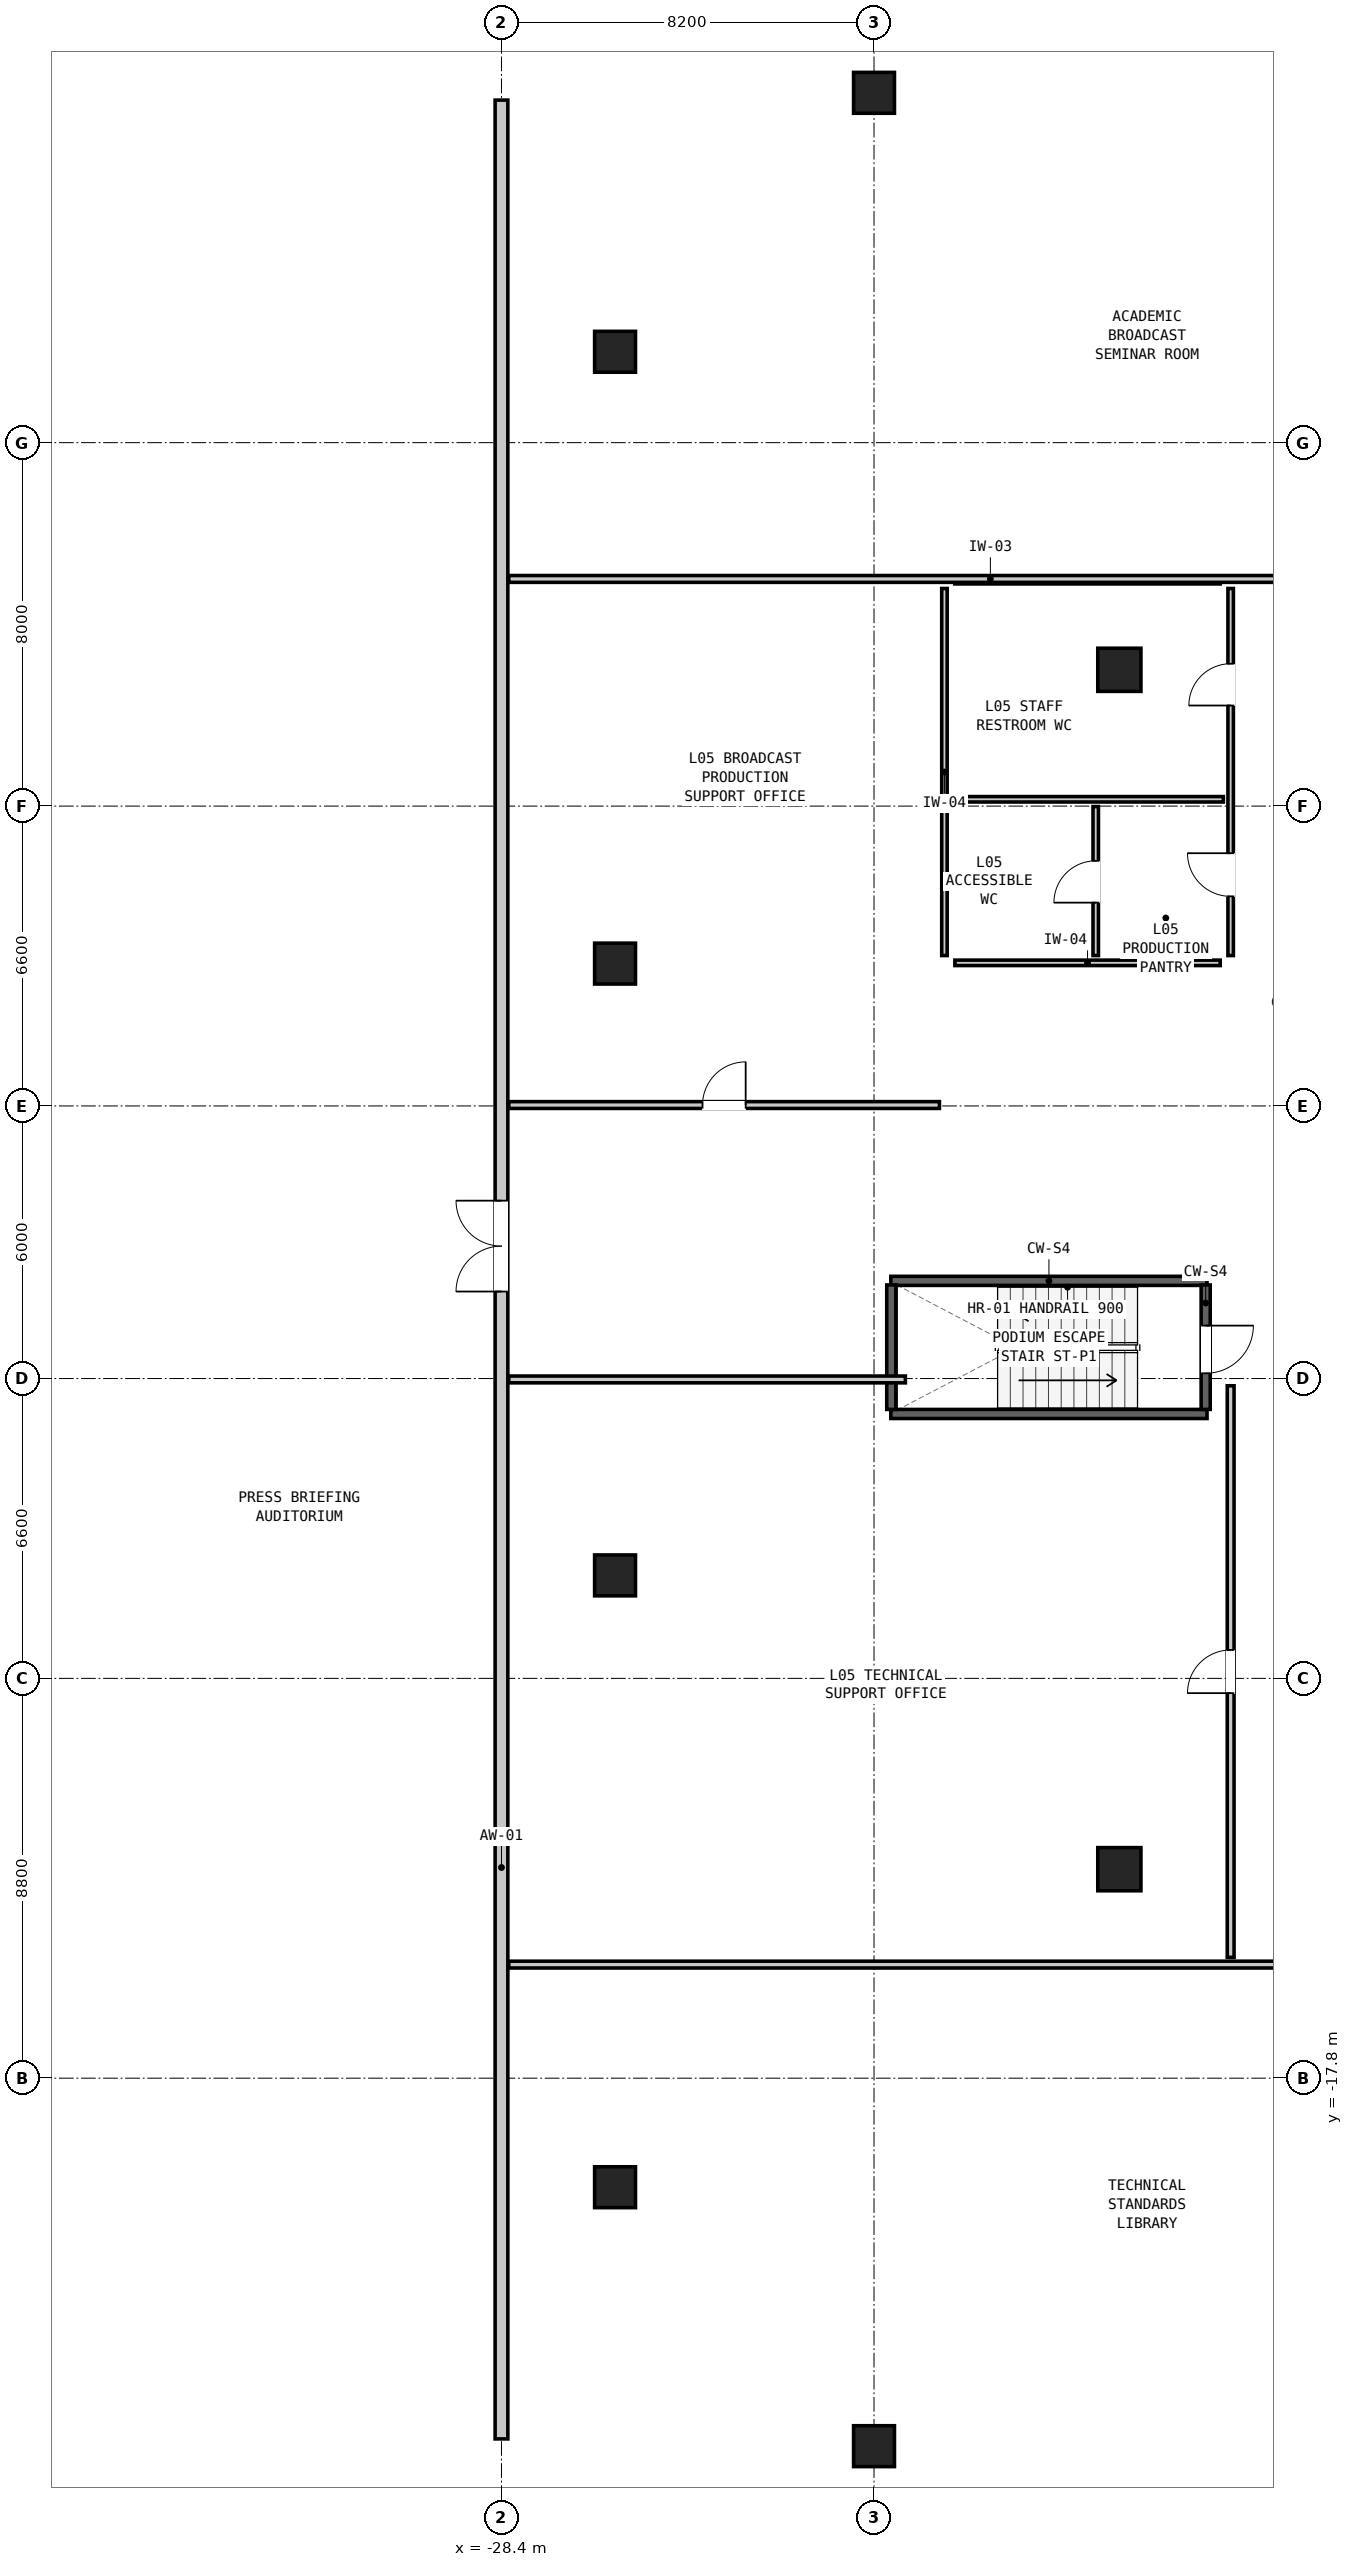
"""IFC4 building model, lengths in metres.
Left out: names, types, materials, properties, quantities, classifications, styles, units other than length and angle.
Written with IfcOpenShell. Run it as: python <this file> out.ifc"""

import sys

from ifc_helpers import new_model, si_unit, direction, frame, frame_2d, origin, origin_2d, place, context, subcontext, project, spatial, rectangle, hollow_rectangle, extrude, element, fill, save


model = new_model("IFC4")
c1 = context("Model", 3, precision=1e-05, world=origin(), true_north=direction((0.0, 1.0)))
c2 = subcontext(c1, "Body", "Model", "MODEL_VIEW")
j1 = project(units=[si_unit("LENGTHUNIT", "METRE"), si_unit("PLANEANGLEUNIT", "RADIAN")], contexts=[c1])
p1 = place(None, origin())
s1 = spatial("IfcSite", under=j1, at=p1, CompositionType="ELEMENT")
p2 = place(p1, origin())
s2 = spatial("IfcBuilding", under=s1, at=p2, CompositionType="ELEMENT")
p3 = place(p2, frame((0.0, 0.0, 21.9)))
s3 = spatial("IfcBuildingStorey", under=s2, at=p3, CompositionType="ELEMENT", Elevation=21.9)
for number, where, z_axis, x_axis in (
    (1, (-14.8, -13.2, 0.0), (0.0, 0.0, 1.0), (1.0, 0.0, 0.0)),
    (2, (-14.8, 13.2, 0.0), (0.0, 0.0, 1.0), (1.0, 0.0, 0.0)),
):
    element("IfcColumn", number, at=place(p3, frame(where, z_axis=z_axis, x_axis=x_axis)), inside=s3, PredefinedType="COLUMN", context=c2, shape_type="SweptSolid", body=[
        extrude(hollow_rectangle(XDim=0.95, YDim=0.95, WallThickness=0.06, at=origin_2d()), origin(), (0.0, 0.0, 1.0), 4.2),
    ])
for number, where, z_axis, x_axis in (
    (3, (-20.2, -25.9, 0.0), (0.0, 0.0, 1.0), (1.0, 0.0, 0.0)),
    (4, (-20.2, 25.9, 0.0), (0.0, 0.0, 1.0), (1.0, 0.0, 0.0)),
    (5, (-25.9, 20.2, 0.0), (0.0, 0.0, 1.0), (0.0, 1.0, 0.0)),
    (6, (-25.9, 6.733, 0.0), (0.0, 0.0, 1.0), (0.0, 1.0, 0.0)),
    (7, (-25.9, -6.733, 0.0), (0.0, 0.0, 1.0), (0.0, 1.0, 0.0)),
    (8, (-25.9, -20.2, 0.0), (0.0, 0.0, 1.0), (0.0, 1.0, 0.0)),
):
    element("IfcColumn", number, at=place(p3, frame(where, z_axis=z_axis, x_axis=x_axis)), inside=s3, PredefinedType="COLUMN", context=c2, shape_type="SweptSolid", body=[
        extrude(hollow_rectangle(XDim=0.9, YDim=0.9, WallThickness=0.055, at=origin_2d()), origin(), (0.0, 0.0, 1.0), 4.2),
    ])
for number, where, z_axis, x_axis in (
    (9, (-19.83, -0.25, 0.0), (0.0, 0.0, 1.0), (1.0, 0.0, 0.0)),
    (10, (-19.83, -3.18, 0.0), (0.0, 0.0, 1.0), (1.0, 0.0, 0.0)),
):
    element("IfcWall", number, at=place(p3, frame(where, z_axis=z_axis, x_axis=x_axis)), inside=s3, PredefinedType="SHEAR", context=c2, shape_type="SweptSolid", body=[
        extrude(rectangle(XDim=6.96, YDim=0.2, at=frame_2d((3.48, 0.0))), origin(), (0.0, 0.0, 1.0), 3.98),
    ])
p4 = place(p3, frame((-12.9, -0.34, 0.0), z_axis=(0.0, 0.0, 1.0), x_axis=(0.0, -1.0, 0.0)))
e11 = element("IfcWall", 11, at=p4, inside=s3, PredefinedType="SHEAR", context=c2, shape_type="SweptSolid", body=[
    extrude(rectangle(XDim=2.74, YDim=0.2, at=frame_2d((1.37, 0.0))), origin(), (0.0, 0.0, 1.0), 3.98),
])
p5 = place(p4, frame((0.895, 0.0, 0.0)))
e12 = element("IfcOpeningElement", 12, at=p5, cuts=e11, PredefinedType="OPENING", context=c2, shape_type="SweptSolid", body=[
    extrude(rectangle(XDim=1.05, YDim=2.08, at=frame_2d((0.525, 1.04))), frame((0.0, 0.112, 0.0), z_axis=(0.0, -1.0, 0.0), x_axis=(1.0, 0.0, 0.0)), (0.0, 0.0, 1.0), 0.224),
])
p6 = place(p3, frame((-19.82, -3.08, 0.0), z_axis=(0.0, 0.0, 1.0), x_axis=(0.0, 1.0, 0.0)))
e13 = element("IfcWall", 13, at=p6, inside=s3, PredefinedType="SHEAR", context=c2, shape_type="SweptSolid", body=[
    extrude(rectangle(XDim=2.74, YDim=0.2, at=frame_2d((1.37, 0.0))), origin(), (0.0, 0.0, 1.0), 3.98),
])
p7 = place(p3, frame((-18.42, 6.75, 0.0), z_axis=(0.0, 0.0, 1.0), x_axis=(1.0, 0.0, 0.0)))
e14 = element("IfcWall", 14, at=p7, inside=s3, PredefinedType="PARTITIONING", context=c2, shape_type="SweptSolid", body=[
    extrude(rectangle(XDim=5.84, YDim=0.12, at=frame_2d((2.92, 0.0))), origin(), (0.0, 0.0, 1.0), 3.424),
])
p8 = place(p3, frame((-18.42, 15.15, 0.0), z_axis=(0.0, 0.0, 1.0), x_axis=(1.0, 0.0, 0.0)))
e15 = element("IfcWall", 15, at=p8, inside=s3, PredefinedType="PARTITIONING", context=c2, shape_type="SweptSolid", body=[
    extrude(rectangle(XDim=5.84, YDim=0.12, at=frame_2d((2.92, 0.0))), origin(), (0.0, 0.0, 1.0), 3.98),
])
p9 = place(p3, frame((-18.65, 6.91, 0.0), z_axis=(0.0, 0.0, 1.0), x_axis=(0.0, 1.0, 0.0)))
e16 = element("IfcWall", 16, at=p9, inside=s3, PredefinedType="PARTITIONING", context=c2, shape_type="SweptSolid", body=[
    extrude(rectangle(XDim=8.08, YDim=0.12, at=frame_2d((4.04, 0.0))), origin(), (0.0, 0.0, 1.0), 3.98),
])
p10 = place(p3, frame((-18.49, 10.35, 0.0), z_axis=(0.0, 0.0, 1.0), x_axis=(1.0, 0.0, 0.0)))
e17 = element("IfcWall", 17, at=p10, inside=s3, PredefinedType="PARTITIONING", context=c2, shape_type="SweptSolid", body=[
    extrude(rectangle(XDim=5.98, YDim=0.12, at=frame_2d((2.99, 0.0))), origin(), (0.0, 0.0, 1.0), 2.949),
])
p11 = place(p3, frame((-15.32, 6.91, 0.0), z_axis=(0.0, 0.0, 1.0), x_axis=(0.0, 1.0, 0.0)))
e18 = element("IfcWall", 18, at=p11, inside=s3, PredefinedType="PARTITIONING", context=c2, shape_type="SweptSolid", body=[
    extrude(rectangle(XDim=3.28, YDim=0.12, at=frame_2d((1.64, 0.0))), origin(), (0.0, 0.0, 1.0), 3.98),
])
p12 = place(p11, frame((1.165, 0.0, 0.0)))
e19 = element("IfcOpeningElement", 19, at=p12, cuts=e18, PredefinedType="OPENING", context=c2, shape_type="SweptSolid", body=[
    extrude(rectangle(XDim=0.92, YDim=2.1, at=frame_2d((0.46, 1.05))), frame((0.0, 0.072, 0.0), z_axis=(0.0, -1.0, 0.0), x_axis=(1.0, 0.0, 0.0)), (0.0, 0.0, 1.0), 0.144),
])
p13 = place(p3, frame((-12.35, 6.91, 0.0), z_axis=(0.0, 0.0, 1.0), x_axis=(0.0, 1.0, 0.0)))
e20 = element("IfcWall", 20, at=p13, inside=s3, PredefinedType="PARTITIONING", context=c2, shape_type="SweptSolid", body=[
    extrude(rectangle(XDim=8.08, YDim=0.12, at=frame_2d((4.04, 0.0))), origin(), (0.0, 0.0, 1.0), 3.98),
])
p14 = place(p13, frame((1.303, 0.0, 0.0)))
e21 = element("IfcOpeningElement", 21, at=p14, cuts=e20, PredefinedType="OPENING", context=c2, shape_type="SweptSolid", body=[
    extrude(rectangle(XDim=0.95, YDim=2.1, at=frame_2d((0.475, 1.05))), frame((0.0, 0.072, 0.0), z_axis=(0.0, -1.0, 0.0), x_axis=(1.0, 0.0, 0.0)), (0.0, 0.0, 1.0), 0.144),
])
p15 = place(p13, frame((5.504, 0.0, 0.0)))
e22 = element("IfcOpeningElement", 22, at=p15, cuts=e20, PredefinedType="OPENING", context=c2, shape_type="SweptSolid", body=[
    extrude(rectangle(XDim=0.92, YDim=2.1, at=frame_2d((0.46, 1.05))), frame((0.0, 0.072, 0.0), z_axis=(0.0, -1.0, 0.0), x_axis=(1.0, 0.0, 0.0)), (0.0, 0.0, 1.0), 0.144),
])
p16 = place(p3, frame((-28.4, -25.74, 0.0), z_axis=(0.0, 0.0, 1.0), x_axis=(0.0, 1.0, 0.0)))
e23 = element("IfcWall", 23, at=p16, inside=s3, PredefinedType="MOVABLE", context=c2, shape_type="SweptSolid", body=[
    extrude(rectangle(XDim=51.48, YDim=0.28, at=frame_2d((25.74, 0.0))), origin(), (0.0, 0.0, 1.0), 3.98),
])
p17 = place(p16, frame((25.255, 0.0, 0.0)))
e24 = element("IfcOpeningElement", 24, at=p17, cuts=e23, PredefinedType="OPENING", context=c2, shape_type="SweptSolid", body=[
    extrude(rectangle(XDim=2.0, YDim=2.14, at=frame_2d((1.0, 1.07))), frame((0.0, 0.152, 0.0), z_axis=(0.0, -1.0, 0.0), x_axis=(1.0, 0.0, 0.0)), (0.0, 0.0, 1.0), 0.304),
])
p18 = place(p3, frame((-28.24, 15.2, 0.0), z_axis=(0.0, 0.0, 1.0), x_axis=(1.0, 0.0, 0.0)))
e25 = element("IfcWall", 25, at=p18, inside=s3, PredefinedType="PARTITIONING", context=c2, shape_type="SweptSolid", body=[
    extrude(rectangle(XDim=28.08, YDim=0.15, at=frame_2d((14.04, 0.0))), origin(), (0.0, 0.0, 1.0), 3.98),
])
p19 = place(p18, frame((21.302, 0.0, 0.0)))
e26 = element("IfcOpeningElement", 26, at=p19, cuts=e25, PredefinedType="OPENING", context=c2, shape_type="SweptSolid", body=[
    extrude(rectangle(XDim=1.2, YDim=2.1, at=frame_2d((0.6, 1.05))), frame((0.0, 0.087, 0.0), z_axis=(0.0, -1.0, 0.0), x_axis=(1.0, 0.0, 0.0)), (0.0, 0.0, 1.0), 0.174),
])
p20 = place(p3, frame((-28.24, -15.3, 0.0), z_axis=(0.0, 0.0, 1.0), x_axis=(1.0, 0.0, 0.0)))
e27 = element("IfcWall", 27, at=p20, inside=s3, PredefinedType="PARTITIONING", context=c2, shape_type="SweptSolid", body=[
    extrude(rectangle(XDim=28.08, YDim=0.15, at=frame_2d((14.04, 0.0))), origin(), (0.0, 0.0, 1.0), 3.98),
])
p21 = place(p20, frame((21.302, 0.0, 0.0)))
e28 = element("IfcOpeningElement", 28, at=p21, cuts=e27, PredefinedType="OPENING", context=c2, shape_type="SweptSolid", body=[
    extrude(rectangle(XDim=1.2, YDim=2.1, at=frame_2d((0.6, 1.05))), frame((0.0, 0.087, 0.0), z_axis=(0.0, -1.0, 0.0), x_axis=(1.0, 0.0, 0.0)), (0.0, 0.0, 1.0), 0.174),
])
p22 = place(p3, frame((-12.35, -15.14, 0.0), z_axis=(0.0, 0.0, 1.0), x_axis=(0.0, 1.0, 0.0)))
e29 = element("IfcWall", 29, at=p22, inside=s3, PredefinedType="PARTITIONING", context=c2, shape_type="SweptSolid", body=[
    extrude(rectangle(XDim=12.58, YDim=0.15, at=frame_2d((6.29, 0.0))), origin(), (0.0, 0.0, 1.0), 3.98),
])
p23 = place(p22, frame((5.815, 0.0, 0.0)))
e30 = element("IfcOpeningElement", 30, at=p23, cuts=e29, PredefinedType="OPENING", context=c2, shape_type="SweptSolid", body=[
    extrude(rectangle(XDim=0.95, YDim=2.1, at=frame_2d((0.475, 1.05))), frame((0.0, 0.087, 0.0), z_axis=(0.0, -1.0, 0.0), x_axis=(1.0, 0.0, 0.0)), (0.0, 0.0, 1.0), 0.174),
])
p24 = place(p3, frame((-28.24, -2.42, 0.0), z_axis=(0.0, 0.0, 1.0), x_axis=(1.0, 0.0, 0.0)))
e31 = element("IfcWall", 31, at=p24, inside=s3, PredefinedType="PARTITIONING", context=c2, shape_type="SweptSolid", body=[
    extrude(rectangle(XDim=8.73, YDim=0.15, at=frame_2d((4.365, 0.0))), origin(), (0.0, 0.0, 1.0), 3.98),
])
p25 = place(p3, frame((-28.24, 3.62, 0.0), z_axis=(0.0, 0.0, 1.0), x_axis=(1.0, 0.0, 0.0)))
e32 = element("IfcWall", 32, at=p25, inside=s3, PredefinedType="PARTITIONING", context=c2, shape_type="SweptSolid", body=[
    extrude(rectangle(XDim=9.48, YDim=0.15, at=frame_2d((4.74, 0.0))), origin(), (0.0, 0.0, 1.0), 2.949),
])
p26 = place(p25, frame((4.265, 0.0, 0.0)))
e33 = element("IfcOpeningElement", 33, at=p26, cuts=e32, PredefinedType="OPENING", context=c2, shape_type="SweptSolid", body=[
    extrude(rectangle(XDim=0.95, YDim=2.1, at=frame_2d((0.475, 1.05))), frame((0.0, 0.087, 0.0), z_axis=(0.0, -1.0, 0.0), x_axis=(1.0, 0.0, 0.0)), (0.0, 0.0, 1.0), 0.174),
])
p27 = place(p5, origin())
e34 = element("IfcDoor", 34, at=p27, inside=s3, OperationType="SINGLE_SWING_LEFT", PredefinedType="DOOR", context=c2, shape_type="SweptSolid", body=[
    extrude(rectangle(XDim=1.05, YDim=2.08, at=frame_2d((0.525, 1.04))), frame((0.0, 0.025, 0.0), z_axis=(0.0, -1.0, 0.0), x_axis=(1.0, 0.0, 0.0)), (0.0, 0.0, 1.0), 0.05),
])
fill(e12, e34)
p28 = place(p12, origin())
e35 = element("IfcDoor", 35, at=p28, inside=s3, OperationType="SINGLE_SWING_LEFT", PredefinedType="DOOR", context=c2, shape_type="SweptSolid", body=[
    extrude(rectangle(XDim=0.92, YDim=2.1, at=frame_2d((0.46, 1.05))), frame((0.0, 0.025, 0.0), z_axis=(0.0, -1.0, 0.0), x_axis=(1.0, 0.0, 0.0)), (0.0, 0.0, 1.0), 0.05),
])
fill(e19, e35)
p29 = place(p14, origin())
e36 = element("IfcDoor", 36, at=p29, inside=s3, OperationType="SINGLE_SWING_RIGHT", PredefinedType="DOOR", context=c2, shape_type="SweptSolid", body=[
    extrude(rectangle(XDim=0.95, YDim=2.1, at=frame_2d((0.475, 1.05))), frame((0.0, 0.025, 0.0), z_axis=(0.0, -1.0, 0.0), x_axis=(1.0, 0.0, 0.0)), (0.0, 0.0, 1.0), 0.05),
])
fill(e21, e36)
p30 = place(p15, origin())
e37 = element("IfcDoor", 37, at=p30, inside=s3, OperationType="SINGLE_SWING_LEFT", PredefinedType="DOOR", context=c2, shape_type="SweptSolid", body=[
    extrude(rectangle(XDim=0.92, YDim=2.1, at=frame_2d((0.46, 1.05))), frame((0.0, 0.025, 0.0), z_axis=(0.0, -1.0, 0.0), x_axis=(1.0, 0.0, 0.0)), (0.0, 0.0, 1.0), 0.05),
])
fill(e22, e37)
p31 = place(p17, origin())
e38 = element("IfcDoor", 38, at=p31, inside=s3, OperationType="DOUBLE_DOOR_SINGLE_SWING", PredefinedType="DOOR", context=c2, shape_type="SweptSolid", body=[
    extrude(rectangle(XDim=2.0, YDim=2.14, at=frame_2d((1.0, 1.07))), frame((0.0, 0.025, 0.0), z_axis=(0.0, -1.0, 0.0), x_axis=(1.0, 0.0, 0.0)), (0.0, 0.0, 1.0), 0.05),
])
fill(e24, e38)
p32 = place(p23, origin())
e39 = element("IfcDoor", 39, at=p32, inside=s3, OperationType="SINGLE_SWING_LEFT", PredefinedType="DOOR", context=c2, shape_type="SweptSolid", body=[
    extrude(rectangle(XDim=0.95, YDim=2.1, at=frame_2d((0.475, 1.05))), frame((0.0, 0.025, 0.0), z_axis=(0.0, -1.0, 0.0), x_axis=(1.0, 0.0, 0.0)), (0.0, 0.0, 1.0), 0.05),
])
fill(e30, e39)
p33 = place(p26, origin())
e40 = element("IfcDoor", 40, at=p33, inside=s3, OperationType="SINGLE_SWING_RIGHT", PredefinedType="DOOR", context=c2, shape_type="SweptSolid", body=[
    extrude(rectangle(XDim=0.95, YDim=2.1, at=frame_2d((0.475, 1.05))), frame((0.0, 0.025, 0.0), z_axis=(0.0, -1.0, 0.0), x_axis=(1.0, 0.0, 0.0)), (0.0, 0.0, 1.0), 0.05),
])
fill(e33, e40)
save(model, sys.argv[1])
